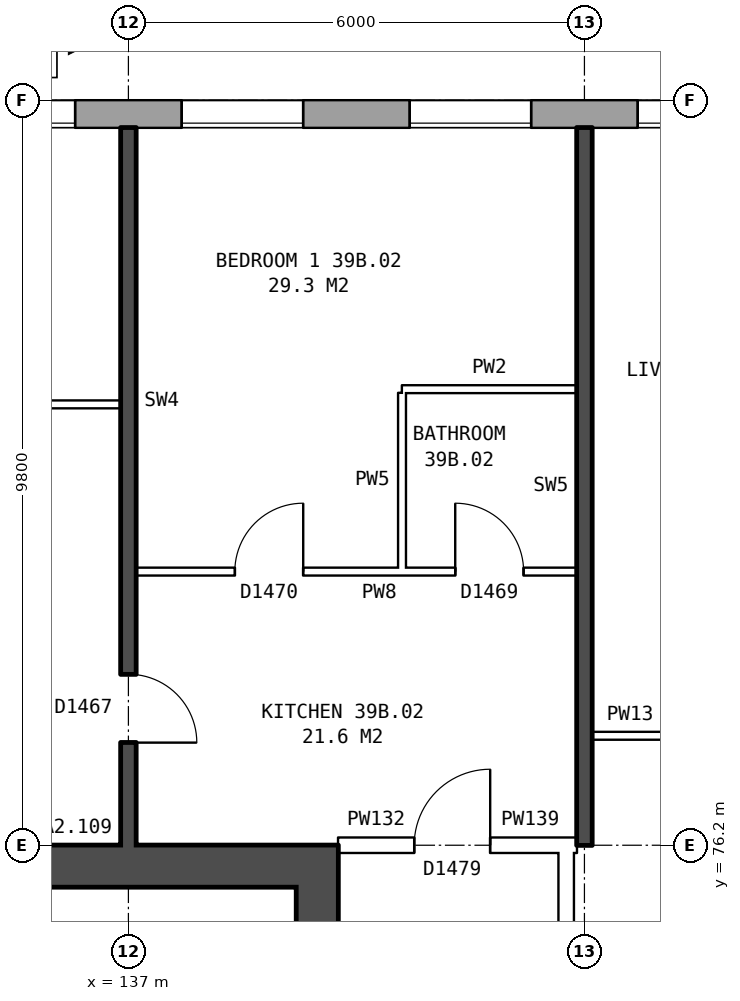
"""IFC4 building model, lengths in metres.
Left out: names, types, materials, properties, quantities, classifications, styles, units other than length and angle.
Written with IfcOpenShell. Run it as: python <this file> out.ifc"""

import sys

from ifc_helpers import new_model, si_unit, direction, frame, frame_2d, origin, place, context, subcontext, project, spatial, rectangle, extrude, element, fill, save


model = new_model("IFC4")
c1 = context("Model", 3, precision=1e-05, world=origin(), true_north=direction((0.0, 1.0)))
c2 = subcontext(c1, "Body", "Model", "MODEL_VIEW")
j1 = project(units=[si_unit("LENGTHUNIT", "METRE"), si_unit("PLANEANGLEUNIT", "RADIAN")], contexts=[c1])
p1 = place(None, origin())
s1 = spatial("IfcSite", under=j1, at=p1, CompositionType="ELEMENT")
p2 = place(p1, origin())
s2 = spatial("IfcBuilding", under=s1, at=p2, CompositionType="ELEMENT")
p3 = place(p2, frame((0.0, 0.0, 139.2)))
s3 = spatial("IfcBuildingStorey", under=s2, at=p3, CompositionType="ELEMENT", Elevation=139.2)
p4 = place(p3, frame((169.675, 85.82, 0.0), z_axis=(0.0, 0.0, 1.0), x_axis=(-1.0, 0.0, 0.0)))
e1 = element("IfcWall", 1, at=p4, inside=s3, PredefinedType="STANDARD", context=c2, shape_type="SweptSolid", body=[
    extrude(rectangle(XDim=35.601, YDim=0.36, at=frame_2d((17.8, 0.0))), origin(), (0.0, 0.0, 1.0), 2.85),
])
p5 = place(p4, frame((0.375, 0.0, 0.8)))
e2 = element("IfcOpeningElement", 2, at=p5, cuts=e1, PredefinedType="OPENING", context=c2, shape_type="SweptSolid", body=[
    extrude(rectangle(XDim=1.6, YDim=1.8, at=frame_2d((0.8, 0.9))), frame((0.0, 0.19, 0.0), z_axis=(0.0, -1.0, 0.0), x_axis=(1.0, 0.0, 0.0)), (0.0, 0.0, 1.0), 0.38),
])
p6 = place(p4, frame((3.375, 0.0, 0.8)))
e3 = element("IfcOpeningElement", 3, at=p6, cuts=e1, PredefinedType="OPENING", context=c2, shape_type="SweptSolid", body=[
    extrude(rectangle(XDim=1.6, YDim=1.8, at=frame_2d((0.8, 0.9))), frame((0.0, 0.19, 0.0), z_axis=(0.0, -1.0, 0.0), x_axis=(1.0, 0.0, 0.0)), (0.0, 0.0, 1.0), 0.38),
])
p7 = place(p4, frame((6.375, 0.0, 0.8)))
e4 = element("IfcOpeningElement", 4, at=p7, cuts=e1, PredefinedType="OPENING", context=c2, shape_type="SweptSolid", body=[
    extrude(rectangle(XDim=1.6, YDim=1.8, at=frame_2d((0.8, 0.9))), frame((0.0, 0.19, 0.0), z_axis=(0.0, -1.0, 0.0), x_axis=(1.0, 0.0, 0.0)), (0.0, 0.0, 1.0), 0.38),
])
p8 = place(p4, frame((9.375, 0.0, 0.8)))
e5 = element("IfcOpeningElement", 5, at=p8, cuts=e1, PredefinedType="OPENING", context=c2, shape_type="SweptSolid", body=[
    extrude(rectangle(XDim=1.6, YDim=1.8, at=frame_2d((0.8, 0.9))), frame((0.0, 0.19, 0.0), z_axis=(0.0, -1.0, 0.0), x_axis=(1.0, 0.0, 0.0)), (0.0, 0.0, 1.0), 0.38),
])
p9 = place(p4, frame((12.375, 0.0, 0.8)))
e6 = element("IfcOpeningElement", 6, at=p9, cuts=e1, PredefinedType="OPENING", context=c2, shape_type="SweptSolid", body=[
    extrude(rectangle(XDim=1.6, YDim=1.8, at=frame_2d((0.8, 0.9))), frame((0.0, 0.19, 0.0), z_axis=(0.0, -1.0, 0.0), x_axis=(1.0, 0.0, 0.0)), (0.0, 0.0, 1.0), 0.38),
])
p10 = place(p4, frame((14.875, 0.0, 1.65)))
e7 = element("IfcOpeningElement", 7, at=p10, cuts=e1, PredefinedType="OPENING", context=c2, shape_type="SweptSolid", body=[
    extrude(rectangle(XDim=1.4, YDim=0.9, at=frame_2d((0.7, 0.45))), frame((0.0, 0.19, 0.0), z_axis=(0.0, -1.0, 0.0), x_axis=(1.0, 0.0, 0.0)), (0.0, 0.0, 1.0), 0.38),
])
p11 = place(p4, frame((17.825, 0.0, 0.25)))
e8 = element("IfcOpeningElement", 8, at=p11, cuts=e1, PredefinedType="OPENING", context=c2, shape_type="SweptSolid", body=[
    extrude(rectangle(XDim=0.6, YDim=1.2, at=frame_2d((0.3, 0.6))), frame((0.0, 0.19, 0.0), z_axis=(0.0, -1.0, 0.0), x_axis=(1.0, 0.0, 0.0)), (0.0, 0.0, 1.0), 0.38),
])
p12 = place(p4, frame((21.375, 0.0, 0.8)))
e9 = element("IfcOpeningElement", 9, at=p12, cuts=e1, PredefinedType="OPENING", context=c2, shape_type="SweptSolid", body=[
    extrude(rectangle(XDim=1.6, YDim=1.8, at=frame_2d((0.8, 0.9))), frame((0.0, 0.19, 0.0), z_axis=(0.0, -1.0, 0.0), x_axis=(1.0, 0.0, 0.0)), (0.0, 0.0, 1.0), 0.38),
])
p13 = place(p4, frame((24.375, 0.0, 0.8)))
e10 = element("IfcOpeningElement", 10, at=p13, cuts=e1, PredefinedType="OPENING", context=c2, shape_type="SweptSolid", body=[
    extrude(rectangle(XDim=1.6, YDim=1.8, at=frame_2d((0.8, 0.9))), frame((0.0, 0.19, 0.0), z_axis=(0.0, -1.0, 0.0), x_axis=(1.0, 0.0, 0.0)), (0.0, 0.0, 1.0), 0.38),
])
p14 = place(p4, frame((27.375, 0.0, 0.8)))
e11 = element("IfcOpeningElement", 11, at=p14, cuts=e1, PredefinedType="OPENING", context=c2, shape_type="SweptSolid", body=[
    extrude(rectangle(XDim=1.6, YDim=1.8, at=frame_2d((0.8, 0.9))), frame((0.0, 0.19, 0.0), z_axis=(0.0, -1.0, 0.0), x_axis=(1.0, 0.0, 0.0)), (0.0, 0.0, 1.0), 0.38),
])
p15 = place(p4, frame((30.375, 0.0, 0.8)))
e12 = element("IfcOpeningElement", 12, at=p15, cuts=e1, PredefinedType="OPENING", context=c2, shape_type="SweptSolid", body=[
    extrude(rectangle(XDim=1.6, YDim=1.8, at=frame_2d((0.8, 0.9))), frame((0.0, 0.19, 0.0), z_axis=(0.0, -1.0, 0.0), x_axis=(1.0, 0.0, 0.0)), (0.0, 0.0, 1.0), 0.38),
])
p16 = place(p4, frame((33.375, 0.0, 0.8)))
e13 = element("IfcOpeningElement", 13, at=p16, cuts=e1, PredefinedType="OPENING", context=c2, shape_type="SweptSolid", body=[
    extrude(rectangle(XDim=1.6, YDim=1.8, at=frame_2d((0.8, 0.9))), frame((0.0, 0.19, 0.0), z_axis=(0.0, -1.0, 0.0), x_axis=(1.0, 0.0, 0.0)), (0.0, 0.0, 1.0), 0.38),
])
p17 = place(p4, frame((16.825, 0.0, 0.15)))
e14 = element("IfcOpeningElement", 14, at=p17, cuts=e1, PredefinedType="OPENING", context=c2, shape_type="SweptSolid", body=[
    extrude(rectangle(XDim=0.6, YDim=0.9, at=frame_2d((0.3, 0.45))), frame((0.0, 0.19, 0.0), z_axis=(0.0, -1.0, 0.0), x_axis=(1.0, 0.0, 0.0)), (0.0, 0.0, 1.0), 0.38),
])
p18 = place(p4, frame((19.575, 0.0, 1.35)))
e15 = element("IfcOpeningElement", 15, at=p18, cuts=e1, PredefinedType="OPENING", context=c2, shape_type="SweptSolid", body=[
    extrude(rectangle(XDim=0.8, YDim=1.2, at=frame_2d((0.4, 0.6))), frame((0.0, 0.19, 0.0), z_axis=(0.0, -1.0, 0.0), x_axis=(1.0, 0.0, 0.0)), (0.0, 0.0, 1.0), 0.38),
])
p19 = place(p3, frame((139.485, 63.8, 0.0), z_axis=(0.0, 0.0, 1.0), x_axis=(0.0, 1.0, 0.0)))
e16 = element("IfcWall", 16, at=p19, inside=s3, PredefinedType="SHEAR", context=c2, shape_type="SweptSolid", body=[
    extrude(rectangle(XDim=12.4, YDim=0.55, at=frame_2d((6.2, 0.0))), origin(), (0.0, 0.0, 1.0), 2.85),
])
p20 = place(p19, frame((1.325, 0.0, 0.0)))
e17 = element("IfcOpeningElement", 17, at=p20, cuts=e16, PredefinedType="OPENING", context=c2, shape_type="SweptSolid", body=[
    extrude(rectangle(XDim=1.1, YDim=2.1, at=frame_2d((0.55, 1.05))), frame((0.0, 0.285, 0.0), z_axis=(0.0, -1.0, 0.0), x_axis=(1.0, 0.0, 0.0)), (0.0, 0.0, 1.0), 0.57),
])
p21 = place(p19, frame((3.6, 0.0, 0.0)))
e18 = element("IfcOpeningElement", 18, at=p21, cuts=e16, PredefinedType="OPENING", context=c2, shape_type="SweptSolid", body=[
    extrude(rectangle(XDim=1.1, YDim=2.1, at=frame_2d((0.55, 1.05))), frame((0.0, 0.285, 0.0), z_axis=(0.0, -1.0, 0.0), x_axis=(1.0, 0.0, 0.0)), (0.0, 0.0, 1.0), 0.57),
])
p22 = place(p19, frame((5.8, 0.0, 0.0)))
e19 = element("IfcOpeningElement", 19, at=p22, cuts=e16, PredefinedType="OPENING", context=c2, shape_type="SweptSolid", body=[
    extrude(rectangle(XDim=1.1, YDim=2.1, at=frame_2d((0.55, 1.05))), frame((0.0, 0.285, 0.0), z_axis=(0.0, -1.0, 0.0), x_axis=(1.0, 0.0, 0.0)), (0.0, 0.0, 1.0), 0.57),
])
p23 = place(p19, frame((9.9, 0.0, 0.0)))
e20 = element("IfcOpeningElement", 20, at=p23, cuts=e16, PredefinedType="OPENING", context=c2, shape_type="SweptSolid", body=[
    extrude(rectangle(XDim=1.1, YDim=2.1, at=frame_2d((0.55, 1.05))), frame((0.0, 0.285, 0.0), z_axis=(0.0, -1.0, 0.0), x_axis=(1.0, 0.0, 0.0)), (0.0, 0.0, 1.0), 0.57),
])
p24 = place(p19, frame((8.125, 0.0, 0.0)))
e21 = element("IfcOpeningElement", 21, at=p24, cuts=e16, PredefinedType="OPENING", context=c2, shape_type="SweptSolid", body=[
    extrude(rectangle(XDim=0.85, YDim=2.1, at=frame_2d((0.425, 1.05))), frame((0.0, 0.285, 0.0), z_axis=(0.0, -1.0, 0.0), x_axis=(1.0, 0.0, 0.0)), (0.0, 0.0, 1.0), 0.57),
])
p25 = place(p3, frame((139.21, 75.925, 0.0), z_axis=(0.0, 0.0, 1.0), x_axis=(-1.0, 0.0, 0.0)))
e22 = element("IfcWall", 22, at=p25, inside=s3, PredefinedType="SHEAR", context=c2, shape_type="SweptSolid", body=[
    extrude(rectangle(XDim=7.3, YDim=0.55, at=frame_2d((3.65, 0.0))), origin(), (0.0, 0.0, 1.0), 2.85),
])
p26 = place(p3, frame((142.76, 63.9, 0.0), z_axis=(0.0, 0.0, 1.0), x_axis=(0.0, 1.0, 0.0)))
e23 = element("IfcWall", 23, at=p26, inside=s3, PredefinedType="PARTITIONING", context=c2, shape_type="SweptSolid", body=[
    extrude(rectangle(XDim=12.2, YDim=0.2, at=frame_2d((6.1, 0.0))), origin(), (0.0, 0.0, 1.0), 2.85),
])
p27 = place(p26, frame((5.1, 0.0, 0.0)))
e24 = element("IfcOpeningElement", 24, at=p27, cuts=e23, PredefinedType="OPENING", context=c2, shape_type="SweptSolid", body=[
    extrude(rectangle(XDim=2.0, YDim=2.1, at=frame_2d((1.0, 1.05))), frame((0.0, 0.11, 0.0), z_axis=(0.0, -1.0, 0.0), x_axis=(1.0, 0.0, 0.0)), (0.0, 0.0, 1.0), 0.22),
])
p28 = place(p3, frame((139.76, 76.2, 0.0), z_axis=(0.0, 0.0, 1.0), x_axis=(1.0, 0.0, 0.0)))
e25 = element("IfcWall", 25, at=p28, inside=s3, PredefinedType="PARTITIONING", context=c2, shape_type="SweptSolid", body=[
    extrude(rectangle(XDim=3.0, YDim=0.2, at=frame_2d((1.5, 0.0))), origin(), (0.0, 0.0, 1.0), 2.85),
])
p29 = place(p28, frame((1.0, 0.0, 0.0)))
e26 = element("IfcOpeningElement", 26, at=p29, cuts=e25, PredefinedType="OPENING", context=c2, shape_type="SweptSolid", body=[
    extrude(rectangle(XDim=1.0, YDim=2.1, at=frame_2d((0.5, 1.05))), frame((0.0, 0.11, 0.0), z_axis=(0.0, -1.0, 0.0), x_axis=(1.0, 0.0, 0.0)), (0.0, 0.0, 1.0), 0.22),
])
p30 = place(p3, frame((142.76, 76.2, 0.0), z_axis=(0.0, 0.0, 1.0), x_axis=(1.0, 0.0, 0.0)))
e27 = element("IfcWall", 27, at=p30, inside=s3, PredefinedType="PARTITIONING", context=c2, shape_type="SweptSolid", body=[
    extrude(rectangle(XDim=0.14, YDim=0.2, at=frame_2d((0.07, 0.0))), origin(), (0.0, 0.0, 1.0), 2.85),
])
p31 = place(p3, frame((143.1, 77.64, 0.0), z_axis=(0.0, 0.0, 1.0), x_axis=(1.0, 0.0, 0.0)))
e28 = element("IfcWall", 28, at=p31, inside=s3, PredefinedType="PARTITIONING", context=c2, shape_type="SweptSolid", body=[
    extrude(rectangle(XDim=2.9, YDim=0.1, at=frame_2d((1.45, 0.0))), origin(), (0.0, 0.0, 1.0), 2.85),
])
p32 = place(p31, frame((1.0, 0.0, 0.0)))
e29 = element("IfcOpeningElement", 29, at=p32, cuts=e28, PredefinedType="OPENING", context=c2, shape_type="SweptSolid", body=[
    extrude(rectangle(XDim=0.9, YDim=2.1, at=frame_2d((0.45, 1.05))), frame((0.0, 0.06, 0.0), z_axis=(0.0, -1.0, 0.0), x_axis=(1.0, 0.0, 0.0)), (0.0, 0.0, 1.0), 0.12),
])
p33 = place(p3, frame((137.1, 79.8, 0.0), z_axis=(0.0, 0.0, 1.0), x_axis=(1.0, 0.0, 0.0)))
e30 = element("IfcWall", 30, at=p33, inside=s3, PredefinedType="PARTITIONING", context=c2, shape_type="SweptSolid", body=[
    extrude(rectangle(XDim=5.8, YDim=0.1, at=frame_2d((2.9, 0.0))), origin(), (0.0, 0.0, 1.0), 2.85),
])
p34 = place(p33, frame((1.3, 0.0, 0.0)))
e31 = element("IfcOpeningElement", 31, at=p34, cuts=e30, PredefinedType="OPENING", context=c2, shape_type="SweptSolid", body=[
    extrude(rectangle(XDim=0.9, YDim=2.1, at=frame_2d((0.45, 1.05))), frame((0.0, 0.06, 0.0), z_axis=(0.0, -1.0, 0.0), x_axis=(1.0, 0.0, 0.0)), (0.0, 0.0, 1.0), 0.12),
])
p35 = place(p33, frame((4.2, 0.0, 0.0)))
e32 = element("IfcOpeningElement", 32, at=p35, cuts=e30, PredefinedType="OPENING", context=c2, shape_type="SweptSolid", body=[
    extrude(rectangle(XDim=0.9, YDim=2.1, at=frame_2d((0.45, 1.05))), frame((0.0, 0.06, 0.0), z_axis=(0.0, -1.0, 0.0), x_axis=(1.0, 0.0, 0.0)), (0.0, 0.0, 1.0), 0.12),
])
p36 = place(p3, frame((131.36, 82.0, 0.0), z_axis=(0.0, 0.0, 1.0), x_axis=(1.0, 0.0, 0.0)))
e33 = element("IfcWall", 33, at=p36, inside=s3, PredefinedType="PARTITIONING", context=c2, shape_type="SweptSolid", body=[
    extrude(rectangle(XDim=5.54, YDim=0.1, at=frame_2d((2.77, 0.0))), origin(), (0.0, 0.0, 1.0), 2.85),
])
p37 = place(p36, frame((2.32, 0.0, 0.0)))
e34 = element("IfcOpeningElement", 34, at=p37, cuts=e33, PredefinedType="OPENING", context=c2, shape_type="SweptSolid", body=[
    extrude(rectangle(XDim=0.9, YDim=2.1, at=frame_2d((0.45, 1.05))), frame((0.0, 0.06, 0.0), z_axis=(0.0, -1.0, 0.0), x_axis=(1.0, 0.0, 0.0)), (0.0, 0.0, 1.0), 0.12),
])
p38 = place(p3, frame((140.6, 82.2, 0.0), z_axis=(0.0, 0.0, 1.0), x_axis=(1.0, 0.0, 0.0)))
e35 = element("IfcWall", 35, at=p38, inside=s3, PredefinedType="PARTITIONING", context=c2, shape_type="SweptSolid", body=[
    extrude(rectangle(XDim=2.3, YDim=0.1, at=frame_2d((1.15, 0.0))), origin(), (0.0, 0.0, 1.0), 2.85),
])
p39 = place(p3, frame((137.0, 76.2, 0.0), z_axis=(0.0, 0.0, 1.0), x_axis=(0.0, 1.0, 0.0)))
e36 = element("IfcWall", 36, at=p39, inside=s3, PredefinedType="SOLIDWALL", context=c2, shape_type="SweptSolid", body=[
    extrude(rectangle(XDim=9.44, YDim=0.2, at=frame_2d((4.72, 0.0))), origin(), (0.0, 0.0, 1.0), 2.85),
])
p40 = place(p39, frame((1.35, 0.0, 0.0)))
e37 = element("IfcOpeningElement", 37, at=p40, cuts=e36, PredefinedType="OPENING", context=c2, shape_type="SweptSolid", body=[
    extrude(rectangle(XDim=0.9, YDim=2.1, at=frame_2d((0.45, 1.05))), frame((0.0, 0.11, 0.0), z_axis=(0.0, -1.0, 0.0), x_axis=(1.0, 0.0, 0.0)), (0.0, 0.0, 1.0), 0.22),
])
p41 = place(p3, frame((140.6, 79.85, 0.0), z_axis=(0.0, 0.0, 1.0), x_axis=(0.0, 1.0, 0.0)))
e38 = element("IfcWall", 38, at=p41, inside=s3, PredefinedType="PARTITIONING", context=c2, shape_type="SweptSolid", body=[
    extrude(rectangle(XDim=2.3, YDim=0.1, at=frame_2d((1.15, 0.0))), origin(), (0.0, 0.0, 1.0), 2.85),
])
p42 = place(p3, frame((143.0, 76.2, 0.0), z_axis=(0.0, 0.0, 1.0), x_axis=(0.0, 1.0, 0.0)))
e39 = element("IfcWall", 39, at=p42, inside=s3, PredefinedType="SOLIDWALL", context=c2, shape_type="SweptSolid", body=[
    extrude(rectangle(XDim=9.44, YDim=0.2, at=frame_2d((4.72, 0.0))), origin(), (0.0, 0.0, 1.0), 2.85),
])
p43 = place(p13, origin())
e40 = element("IfcWindow", 40, at=p43, inside=s3, PartitioningType="SINGLE_PANEL", PredefinedType="WINDOW", context=c2, shape_type="SweptSolid", body=[
    extrude(rectangle(XDim=1.6, YDim=1.8, at=frame_2d((0.8, 0.9))), frame((0.0, 0.15, 0.0), z_axis=(0.0, -1.0, 0.0), x_axis=(1.0, 0.0, 0.0)), (0.0, 0.0, 1.0), 0.06),
])
fill(e10, e40)
p44 = place(p14, origin())
e41 = element("IfcWindow", 41, at=p44, inside=s3, PartitioningType="SINGLE_PANEL", PredefinedType="WINDOW", context=c2, shape_type="SweptSolid", body=[
    extrude(rectangle(XDim=1.6, YDim=1.8, at=frame_2d((0.8, 0.9))), frame((0.0, 0.15, 0.0), z_axis=(0.0, -1.0, 0.0), x_axis=(1.0, 0.0, 0.0)), (0.0, 0.0, 1.0), 0.06),
])
fill(e11, e41)
p45 = place(p15, origin())
e42 = element("IfcWindow", 42, at=p45, inside=s3, PartitioningType="SINGLE_PANEL", PredefinedType="WINDOW", context=c2, shape_type="SweptSolid", body=[
    extrude(rectangle(XDim=1.6, YDim=1.8, at=frame_2d((0.8, 0.9))), frame((0.0, 0.15, 0.0), z_axis=(0.0, -1.0, 0.0), x_axis=(1.0, 0.0, 0.0)), (0.0, 0.0, 1.0), 0.06),
])
fill(e12, e42)
p46 = place(p16, origin())
e43 = element("IfcWindow", 43, at=p46, inside=s3, PartitioningType="SINGLE_PANEL", PredefinedType="WINDOW", context=c2, shape_type="SweptSolid", body=[
    extrude(rectangle(XDim=1.6, YDim=1.8, at=frame_2d((0.8, 0.9))), frame((0.0, 0.15, 0.0), z_axis=(0.0, -1.0, 0.0), x_axis=(1.0, 0.0, 0.0)), (0.0, 0.0, 1.0), 0.06),
])
fill(e13, e43)
p47 = place(p34, origin())
e44 = element("IfcDoor", 44, at=p47, inside=s3, OperationType="SINGLE_SWING_RIGHT", PredefinedType="DOOR", context=c2, shape_type="SweptSolid", body=[
    extrude(rectangle(XDim=0.9, YDim=2.1, at=frame_2d((0.45, 1.05))), frame((0.0, 0.025, 0.0), z_axis=(0.0, -1.0, 0.0), x_axis=(1.0, 0.0, 0.0)), (0.0, 0.0, 1.0), 0.05),
])
fill(e31, e44)
p48 = place(p29, origin())
e45 = element("IfcDoor", 45, at=p48, inside=s3, OperationType="SINGLE_SWING_RIGHT", PredefinedType="DOOR", context=c2, shape_type="SweptSolid", body=[
    extrude(rectangle(XDim=1.0, YDim=2.1, at=frame_2d((0.5, 1.05))), frame((0.0, 0.025, 0.0), z_axis=(0.0, -1.0, 0.0), x_axis=(1.0, 0.0, 0.0)), (0.0, 0.0, 1.0), 0.05),
])
fill(e26, e45)
p49 = place(p40, frame((0.9, 0.0, 0.0), z_axis=(0.0, 0.0, 1.0), x_axis=(-1.0, 0.0, 0.0)))
e46 = element("IfcDoor", 46, at=p49, inside=s3, OperationType="SINGLE_SWING_RIGHT", PredefinedType="DOOR", context=c2, shape_type="SweptSolid", body=[
    extrude(rectangle(XDim=0.9, YDim=2.1, at=frame_2d((0.45, 1.05))), frame((0.0, 0.025, 0.0), z_axis=(0.0, -1.0, 0.0), x_axis=(1.0, 0.0, 0.0)), (0.0, 0.0, 1.0), 0.05),
])
fill(e37, e46)
p50 = place(p35, origin())
e47 = element("IfcDoor", 47, at=p50, inside=s3, OperationType="SINGLE_SWING_LEFT", PredefinedType="DOOR", context=c2, shape_type="SweptSolid", body=[
    extrude(rectangle(XDim=0.9, YDim=2.1, at=frame_2d((0.45, 1.05))), frame((0.0, 0.025, 0.0), z_axis=(0.0, -1.0, 0.0), x_axis=(1.0, 0.0, 0.0)), (0.0, 0.0, 1.0), 0.05),
])
fill(e32, e47)
save(model, sys.argv[1])
